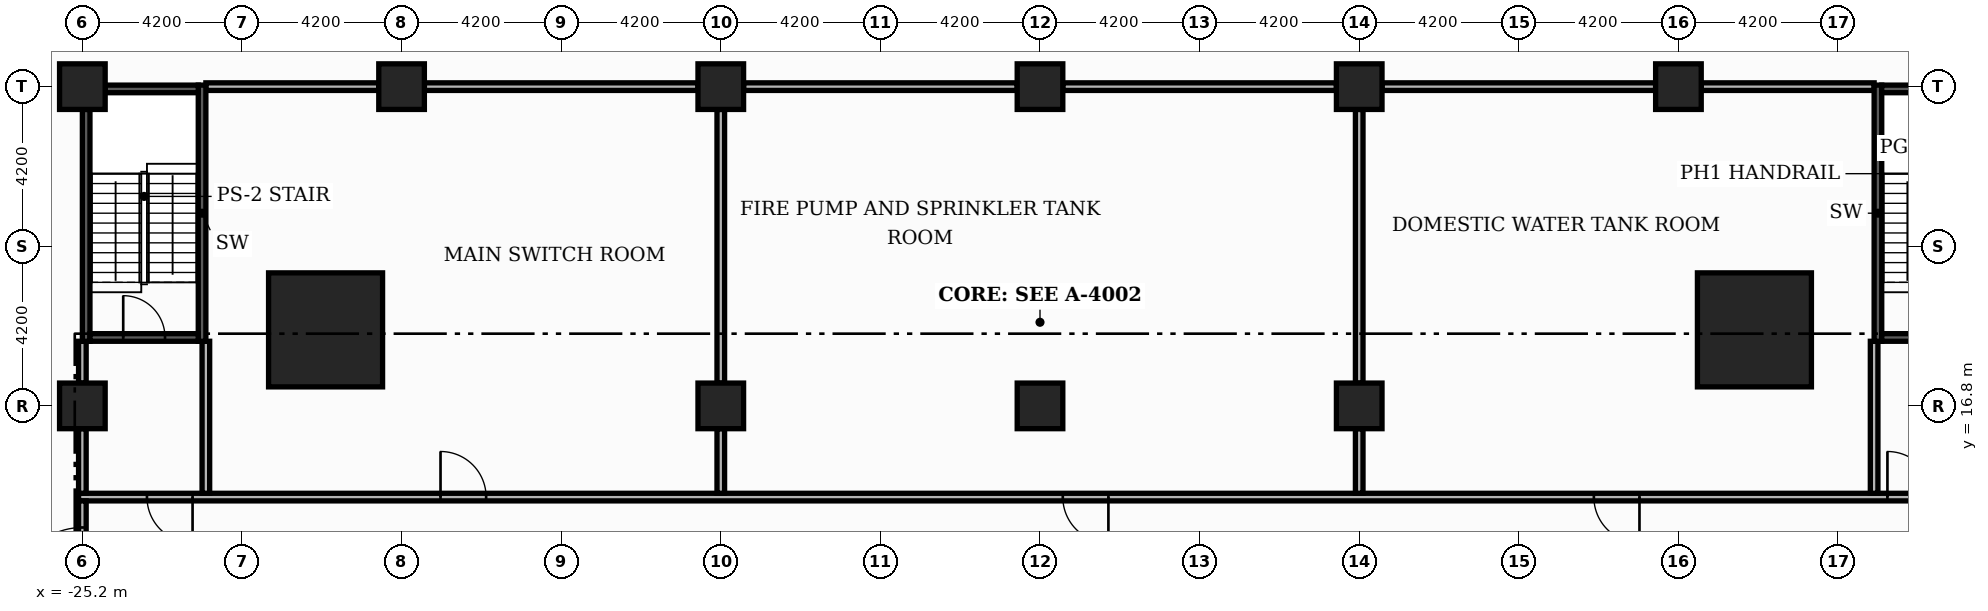
"""IFC4 building model, lengths in metres.
Left out: names, types, materials, properties, quantities, classifications, styles, units other than length and angle.
Written with IfcOpenShell. Run it as: python <this file> out.ifc"""

import sys

from ifc_helpers import new_model, si_unit, direction, frame, frame_2d, origin, origin_2d, place, context, subcontext, project, spatial, rectangle, extrude, element, fill, save


model = new_model("IFC4")
c1 = context("Model", 3, precision=1e-05, world=origin(), true_north=direction((0.0, 1.0)))
c2 = subcontext(c1, "Body", "Model", "MODEL_VIEW")
j1 = project(units=[si_unit("LENGTHUNIT", "METRE"), si_unit("PLANEANGLEUNIT", "RADIAN")], contexts=[c1])
p1 = place(None, origin())
s1 = spatial("IfcSite", under=j1, at=p1, CompositionType="ELEMENT")
p2 = place(p1, origin())
s2 = spatial("IfcBuilding", under=s1, at=p2, CompositionType="ELEMENT")
p3 = place(p2, frame((0.0, 0.0, -4.2)))
s3 = spatial("IfcBuildingStorey", under=s2, at=p3, CompositionType="ELEMENT", Elevation=-4.2)
for number, where, z_axis, x_axis in (
    (1, (18.8, 18.8, 0.0), (0.0, 0.0, 1.0), (1.0, 0.0, 0.0)),
    (2, (-18.8, 18.8, 0.0), (0.0, 0.0, 1.0), (1.0, 0.0, 0.0)),
):
    element("IfcColumn", number, at=place(p3, frame(where, z_axis=z_axis, x_axis=x_axis)), inside=s3, PredefinedType="COLUMN", context=c2, shape_type="SweptSolid", body=[
        extrude(rectangle(XDim=3.0, YDim=3.0, at=origin_2d()), origin(), (0.0, 0.0, 1.0), 4.2),
    ])
for number, where, z_axis, x_axis in (
    (3, (0.0, 25.2, 0.0), (0.0, 0.0, 1.0), (1.0, 0.0, 0.0)),
    (4, (-8.4, 25.2, 0.0), (0.0, 0.0, 1.0), (1.0, 0.0, 0.0)),
    (5, (-16.8, 25.2, 0.0), (0.0, 0.0, 1.0), (1.0, 0.0, 0.0)),
    (6, (8.4, 25.2, 0.0), (0.0, 0.0, 1.0), (1.0, 0.0, 0.0)),
    (7, (16.8, 25.2, 0.0), (0.0, 0.0, 1.0), (1.0, 0.0, 0.0)),
    (8, (-25.2, 16.8, 0.0), (0.0, 0.0, 1.0), (1.0, 0.0, 0.0)),
    (9, (0.0, 16.8, 0.0), (0.0, 0.0, 1.0), (1.0, 0.0, 0.0)),
    (10, (8.4, 16.8, 0.0), (0.0, 0.0, 1.0), (1.0, 0.0, 0.0)),
    (11, (-8.4, 16.8, 0.0), (0.0, 0.0, 1.0), (1.0, 0.0, 0.0)),
    (12, (-25.2, 25.2, 0.0), (0.0, 0.0, 1.0), (1.0, 0.0, 0.0)),
):
    element("IfcColumn", number, at=place(p3, frame(where, z_axis=z_axis, x_axis=x_axis)), inside=s3, PredefinedType="COLUMN", context=c2, shape_type="SweptSolid", body=[
        extrude(rectangle(XDim=1.2, YDim=1.2, at=origin_2d()), origin(), (0.0, 0.0, 1.0), 4.2),
    ])
p4 = place(p3, frame((-25.3, 14.4, 0.0), z_axis=(0.0, 0.0, 1.0), x_axis=(1.0, 0.0, 0.0)))
e13 = element("IfcWall", 13, at=p4, inside=s3, PredefinedType="PARTITIONING", context=c2, shape_type="SweptSolid", body=[
    extrude(rectangle(XDim=50.6, YDim=0.2, at=frame_2d((25.3, 0.0))), origin(), (0.0, 0.0, 1.0), 3.78),
])
p5 = place(p4, frame((1.8, 0.0, 0.0)))
e14 = element("IfcOpeningElement", 14, at=p5, cuts=e13, PredefinedType="OPENING", context=c2, shape_type="SweptSolid", body=[
    extrude(rectangle(XDim=1.2, YDim=2.2, at=frame_2d((0.6, 1.1))), frame((0.0, 0.11, 0.0), z_axis=(0.0, -1.0, 0.0), x_axis=(1.0, 0.0, 0.0)), (0.0, 0.0, 1.0), 0.22),
])
p6 = place(p4, frame((9.525, 0.0, 0.0)))
e15 = element("IfcOpeningElement", 15, at=p6, cuts=e13, PredefinedType="OPENING", context=c2, shape_type="SweptSolid", body=[
    extrude(rectangle(XDim=1.2, YDim=2.2, at=frame_2d((0.6, 1.1))), frame((0.0, 0.11, 0.0), z_axis=(0.0, -1.0, 0.0), x_axis=(1.0, 0.0, 0.0)), (0.0, 0.0, 1.0), 0.22),
])
p7 = place(p4, frame((25.9, 0.0, 0.0)))
e16 = element("IfcOpeningElement", 16, at=p7, cuts=e13, PredefinedType="OPENING", context=c2, shape_type="SweptSolid", body=[
    extrude(rectangle(XDim=1.2, YDim=2.2, at=frame_2d((0.6, 1.1))), frame((0.0, 0.11, 0.0), z_axis=(0.0, -1.0, 0.0), x_axis=(1.0, 0.0, 0.0)), (0.0, 0.0, 1.0), 0.22),
])
p8 = place(p4, frame((39.875, 0.0, 0.0)))
e17 = element("IfcOpeningElement", 17, at=p8, cuts=e13, PredefinedType="OPENING", context=c2, shape_type="SweptSolid", body=[
    extrude(rectangle(XDim=1.2, YDim=2.2, at=frame_2d((0.6, 1.1))), frame((0.0, 0.11, 0.0), z_axis=(0.0, -1.0, 0.0), x_axis=(1.0, 0.0, 0.0)), (0.0, 0.0, 1.0), 0.22),
])
p9 = place(p4, frame((47.6, 0.0, 0.0)))
e18 = element("IfcOpeningElement", 18, at=p9, cuts=e13, PredefinedType="OPENING", context=c2, shape_type="SweptSolid", body=[
    extrude(rectangle(XDim=1.2, YDim=2.2, at=frame_2d((0.6, 1.1))), frame((0.0, 0.11, 0.0), z_axis=(0.0, -1.0, 0.0), x_axis=(1.0, 0.0, 0.0)), (0.0, 0.0, 1.0), 0.22),
])
p10 = place(p3, frame((-21.95, 25.2, 0.0), z_axis=(0.0, 0.0, 1.0), x_axis=(1.0, 0.0, 0.0)))
e19 = element("IfcWall", 19, at=p10, inside=s3, PredefinedType="PARTITIONING", context=c2, shape_type="SweptSolid", body=[
    extrude(rectangle(XDim=4.55, YDim=0.2, at=frame_2d((2.275, 0.0))), origin(), (0.0, 0.0, 1.0), 3.78),
])
for number, where, z_axis, x_axis in (
    (20, (-16.2, 25.2, 0.0), (0.0, 0.0, 1.0), (1.0, 0.0, 0.0)),
    (21, (-7.8, 25.2, 0.0), (0.0, 0.0, 1.0), (1.0, 0.0, 0.0)),
    (22, (0.6, 25.2, 0.0), (0.0, 0.0, 1.0), (1.0, 0.0, 0.0)),
    (23, (9.0, 25.2, 0.0), (0.0, 0.0, 1.0), (1.0, 0.0, 0.0)),
):
    element("IfcWall", number, at=place(p3, frame(where, z_axis=z_axis, x_axis=x_axis)), inside=s3, PredefinedType="PARTITIONING", context=c2, shape_type="SweptSolid", body=[
        extrude(rectangle(XDim=7.2, YDim=0.2, at=frame_2d((3.6, 0.0))), origin(), (0.0, 0.0, 1.0), 3.78),
    ])
p11 = place(p3, frame((17.4, 25.2, 0.0), z_axis=(0.0, 0.0, 1.0), x_axis=(1.0, 0.0, 0.0)))
e24 = element("IfcWall", 24, at=p11, inside=s3, PredefinedType="PARTITIONING", context=c2, shape_type="SweptSolid", body=[
    extrude(rectangle(XDim=4.55, YDim=0.2, at=frame_2d((2.275, 0.0))), origin(), (0.0, 0.0, 1.0), 3.78),
])
p12 = place(p3, frame((-25.2, 11.1, 0.0), z_axis=(0.0, 0.0, 1.0), x_axis=(0.0, 1.0, 0.0)))
e25 = element("IfcWall", 25, at=p12, inside=s3, PredefinedType="PARTITIONING", context=c2, shape_type="SweptSolid", body=[
    extrude(rectangle(XDim=3.2, YDim=0.2, at=frame_2d((1.6, 0.0))), origin(), (0.0, 0.0, 1.0), 3.78),
])
p13 = place(p12, frame((0.7, 0.0, 0.0)))
e26 = element("IfcOpeningElement", 26, at=p13, cuts=e25, PredefinedType="OPENING", context=c2, shape_type="SweptSolid", body=[
    extrude(rectangle(XDim=1.8, YDim=2.2, at=frame_2d((0.9, 1.1))), frame((0.0, 0.11, 0.0), z_axis=(0.0, -1.0, 0.0), x_axis=(1.0, 0.0, 0.0)), (0.0, 0.0, 1.0), 0.22),
])
p14 = place(p3, frame((-25.2, 14.5, 0.0), z_axis=(0.0, 0.0, 1.0), x_axis=(0.0, 1.0, 0.0)))
e27 = element("IfcWall", 27, at=p14, inside=s3, PredefinedType="PARTITIONING", context=c2, shape_type="SweptSolid", body=[
    extrude(rectangle(XDim=1.7, YDim=0.2, at=frame_2d((0.85, 0.0))), origin(), (0.0, 0.0, 1.0), 3.78),
])
p15 = place(p3, frame((-25.2, 17.4, 0.0), z_axis=(0.0, 0.0, 1.0), x_axis=(0.0, 1.0, 0.0)))
e28 = element("IfcWall", 28, at=p15, inside=s3, PredefinedType="PARTITIONING", context=c2, shape_type="SweptSolid", body=[
    extrude(rectangle(XDim=1.1, YDim=0.2, at=frame_2d((0.55, 0.0))), origin(), (0.0, 0.0, 1.0), 3.78),
])
p16 = place(p3, frame((-21.95, 14.5, 0.0), z_axis=(0.0, 0.0, 1.0), x_axis=(0.0, 1.0, 0.0)))
e29 = element("IfcWall", 29, at=p16, inside=s3, PredefinedType="PARTITIONING", context=c2, shape_type="SweptSolid", body=[
    extrude(rectangle(XDim=4.0, YDim=0.2, at=frame_2d((2.0, 0.0))), origin(), (0.0, 0.0, 1.0), 3.78),
])
p17 = place(p3, frame((-8.4, 14.5, 0.0), z_axis=(0.0, 0.0, 1.0), x_axis=(0.0, 1.0, 0.0)))
e30 = element("IfcWall", 30, at=p17, inside=s3, PredefinedType="PARTITIONING", context=c2, shape_type="SweptSolid", body=[
    extrude(rectangle(XDim=1.7, YDim=0.2, at=frame_2d((0.85, 0.0))), origin(), (0.0, 0.0, 1.0), 3.78),
])
p18 = place(p3, frame((-8.4, 17.4, 0.0), z_axis=(0.0, 0.0, 1.0), x_axis=(0.0, 1.0, 0.0)))
e31 = element("IfcWall", 31, at=p18, inside=s3, PredefinedType="PARTITIONING", context=c2, shape_type="SweptSolid", body=[
    extrude(rectangle(XDim=7.2, YDim=0.2, at=frame_2d((3.6, 0.0))), origin(), (0.0, 0.0, 1.0), 3.78),
])
p19 = place(p3, frame((8.4, 14.5, 0.0), z_axis=(0.0, 0.0, 1.0), x_axis=(0.0, 1.0, 0.0)))
e32 = element("IfcWall", 32, at=p19, inside=s3, PredefinedType="PARTITIONING", context=c2, shape_type="SweptSolid", body=[
    extrude(rectangle(XDim=1.7, YDim=0.2, at=frame_2d((0.85, 0.0))), origin(), (0.0, 0.0, 1.0), 3.78),
])
p20 = place(p3, frame((8.4, 17.4, 0.0), z_axis=(0.0, 0.0, 1.0), x_axis=(0.0, 1.0, 0.0)))
e33 = element("IfcWall", 33, at=p20, inside=s3, PredefinedType="PARTITIONING", context=c2, shape_type="SweptSolid", body=[
    extrude(rectangle(XDim=7.2, YDim=0.2, at=frame_2d((3.6, 0.0))), origin(), (0.0, 0.0, 1.0), 3.78),
])
p21 = place(p3, frame((21.95, 14.5, 0.0), z_axis=(0.0, 0.0, 1.0), x_axis=(0.0, 1.0, 0.0)))
e34 = element("IfcWall", 34, at=p21, inside=s3, PredefinedType="PARTITIONING", context=c2, shape_type="SweptSolid", body=[
    extrude(rectangle(XDim=4.0, YDim=0.2, at=frame_2d((2.0, 0.0))), origin(), (0.0, 0.0, 1.0), 3.78),
])
p22 = place(p3, frame((22.05, 18.5, 0.0), z_axis=(0.0, 0.0, 1.0), x_axis=(0.0, 1.0, 0.0)))
e35 = element("IfcWall", 35, at=p22, inside=s3, PredefinedType="SOLIDWALL", context=c2, shape_type="SweptSolid", body=[
    extrude(rectangle(XDim=6.74, YDim=0.2, at=frame_2d((3.37, 0.0))), origin(), (0.0, 0.0, 1.0), 3.78),
])
p23 = place(p3, frame((22.15, 18.6, 0.0), z_axis=(0.0, 0.0, 1.0), x_axis=(1.0, 0.0, 0.0)))
e36 = element("IfcWall", 36, at=p23, inside=s3, PredefinedType="SOLIDWALL", context=c2, shape_type="SweptSolid", body=[
    extrude(rectangle(XDim=2.85, YDim=0.2, at=frame_2d((1.425, 0.0))), origin(), (0.0, 0.0, 1.0), 3.78),
])
p24 = place(p23, frame((0.875, 0.0, 0.0)))
e37 = element("IfcOpeningElement", 37, at=p24, cuts=e36, PredefinedType="OPENING", context=c2, shape_type="SweptSolid", body=[
    extrude(rectangle(XDim=1.1, YDim=2.2, at=frame_2d((0.55, 1.1))), frame((0.0, 0.11, 0.0), z_axis=(0.0, -1.0, 0.0), x_axis=(1.0, 0.0, 0.0)), (0.0, 0.0, 1.0), 0.22),
])
p25 = place(p3, frame((22.15, 25.14, 0.0), z_axis=(0.0, 0.0, 1.0), x_axis=(1.0, 0.0, 0.0)))
e38 = element("IfcWall", 38, at=p25, inside=s3, PredefinedType="SOLIDWALL", context=c2, shape_type="SweptSolid", body=[
    extrude(rectangle(XDim=2.45, YDim=0.2, at=frame_2d((1.225, 0.0))), origin(), (0.0, 0.0, 1.0), 3.78),
])
p26 = place(p3, frame((-25.1, 18.5, 0.0), z_axis=(0.0, 0.0, 1.0), x_axis=(0.0, 1.0, 0.0)))
e39 = element("IfcWall", 39, at=p26, inside=s3, PredefinedType="SOLIDWALL", context=c2, shape_type="SweptSolid", body=[
    extrude(rectangle(XDim=6.1, YDim=0.2, at=frame_2d((3.05, 0.0))), origin(), (0.0, 0.0, 1.0), 3.78),
])
p27 = place(p3, frame((-22.05, 18.5, 0.0), z_axis=(0.0, 0.0, 1.0), x_axis=(0.0, 1.0, 0.0)))
e40 = element("IfcWall", 40, at=p27, inside=s3, PredefinedType="SOLIDWALL", context=c2, shape_type="SweptSolid", body=[
    extrude(rectangle(XDim=6.74, YDim=0.2, at=frame_2d((3.37, 0.0))), origin(), (0.0, 0.0, 1.0), 3.78),
])
p28 = place(p3, frame((-25.0, 18.6, 0.0), z_axis=(0.0, 0.0, 1.0), x_axis=(1.0, 0.0, 0.0)))
e41 = element("IfcWall", 41, at=p28, inside=s3, PredefinedType="SOLIDWALL", context=c2, shape_type="SweptSolid", body=[
    extrude(rectangle(XDim=2.85, YDim=0.2, at=frame_2d((1.425, 0.0))), origin(), (0.0, 0.0, 1.0), 3.78),
])
p29 = place(p28, frame((0.875, 0.0, 0.0)))
e42 = element("IfcOpeningElement", 42, at=p29, cuts=e41, PredefinedType="OPENING", context=c2, shape_type="SweptSolid", body=[
    extrude(rectangle(XDim=1.1, YDim=2.2, at=frame_2d((0.55, 1.1))), frame((0.0, 0.11, 0.0), z_axis=(0.0, -1.0, 0.0), x_axis=(1.0, 0.0, 0.0)), (0.0, 0.0, 1.0), 0.22),
])
p30 = place(p3, frame((-24.6, 25.14, 0.0), z_axis=(0.0, 0.0, 1.0), x_axis=(1.0, 0.0, 0.0)))
e43 = element("IfcWall", 43, at=p30, inside=s3, PredefinedType="SOLIDWALL", context=c2, shape_type="SweptSolid", body=[
    extrude(rectangle(XDim=2.45, YDim=0.2, at=frame_2d((1.225, 0.0))), origin(), (0.0, 0.0, 1.0), 3.78),
])
p31 = place(p13, origin())
e44 = element("IfcDoor", 44, at=p31, inside=s3, OperationType="DOUBLE_DOOR_SINGLE_SWING", PredefinedType="DOOR", context=c2, shape_type="SweptSolid", body=[
    extrude(rectangle(XDim=1.8, YDim=2.2, at=frame_2d((0.9, 1.1))), frame((0.0, 0.025, 0.0), z_axis=(0.0, -1.0, 0.0), x_axis=(1.0, 0.0, 0.0)), (0.0, 0.0, 1.0), 0.05),
])
fill(e26, e44)
p32 = place(p5, origin())
e45 = element("IfcDoor", 45, at=p32, inside=s3, OperationType="SINGLE_SWING_RIGHT", PredefinedType="DOOR", context=c2, shape_type="SweptSolid", body=[
    extrude(rectangle(XDim=1.2, YDim=2.2, at=frame_2d((0.6, 1.1))), frame((0.0, 0.025, 0.0), z_axis=(0.0, -1.0, 0.0), x_axis=(1.0, 0.0, 0.0)), (0.0, 0.0, 1.0), 0.05),
])
fill(e14, e45)
p33 = place(p6, origin())
e46 = element("IfcDoor", 46, at=p33, inside=s3, OperationType="SINGLE_SWING_LEFT", PredefinedType="DOOR", context=c2, shape_type="SweptSolid", body=[
    extrude(rectangle(XDim=1.2, YDim=2.2, at=frame_2d((0.6, 1.1))), frame((0.0, 0.025, 0.0), z_axis=(0.0, -1.0, 0.0), x_axis=(1.0, 0.0, 0.0)), (0.0, 0.0, 1.0), 0.05),
])
fill(e15, e46)
p34 = place(p7, origin())
e47 = element("IfcDoor", 47, at=p34, inside=s3, OperationType="SINGLE_SWING_RIGHT", PredefinedType="DOOR", context=c2, shape_type="SweptSolid", body=[
    extrude(rectangle(XDim=1.2, YDim=2.2, at=frame_2d((0.6, 1.1))), frame((0.0, 0.025, 0.0), z_axis=(0.0, -1.0, 0.0), x_axis=(1.0, 0.0, 0.0)), (0.0, 0.0, 1.0), 0.05),
])
fill(e16, e47)
p35 = place(p8, origin())
e48 = element("IfcDoor", 48, at=p35, inside=s3, OperationType="SINGLE_SWING_RIGHT", PredefinedType="DOOR", context=c2, shape_type="SweptSolid", body=[
    extrude(rectangle(XDim=1.2, YDim=2.2, at=frame_2d((0.6, 1.1))), frame((0.0, 0.025, 0.0), z_axis=(0.0, -1.0, 0.0), x_axis=(1.0, 0.0, 0.0)), (0.0, 0.0, 1.0), 0.05),
])
fill(e17, e48)
p36 = place(p9, origin())
e49 = element("IfcDoor", 49, at=p36, inside=s3, OperationType="SINGLE_SWING_LEFT", PredefinedType="DOOR", context=c2, shape_type="SweptSolid", body=[
    extrude(rectangle(XDim=1.2, YDim=2.2, at=frame_2d((0.6, 1.1))), frame((0.0, 0.025, 0.0), z_axis=(0.0, -1.0, 0.0), x_axis=(1.0, 0.0, 0.0)), (0.0, 0.0, 1.0), 0.05),
])
fill(e18, e49)
p37 = place(p29, origin())
e50 = element("IfcDoor", 50, at=p37, inside=s3, OperationType="SINGLE_SWING_LEFT", PredefinedType="DOOR", context=c2, shape_type="SweptSolid", body=[
    extrude(rectangle(XDim=1.1, YDim=2.2, at=frame_2d((0.55, 1.1))), frame((0.0, 0.025, 0.0), z_axis=(0.0, -1.0, 0.0), x_axis=(1.0, 0.0, 0.0)), (0.0, 0.0, 1.0), 0.05),
])
fill(e42, e50)
save(model, sys.argv[1])
